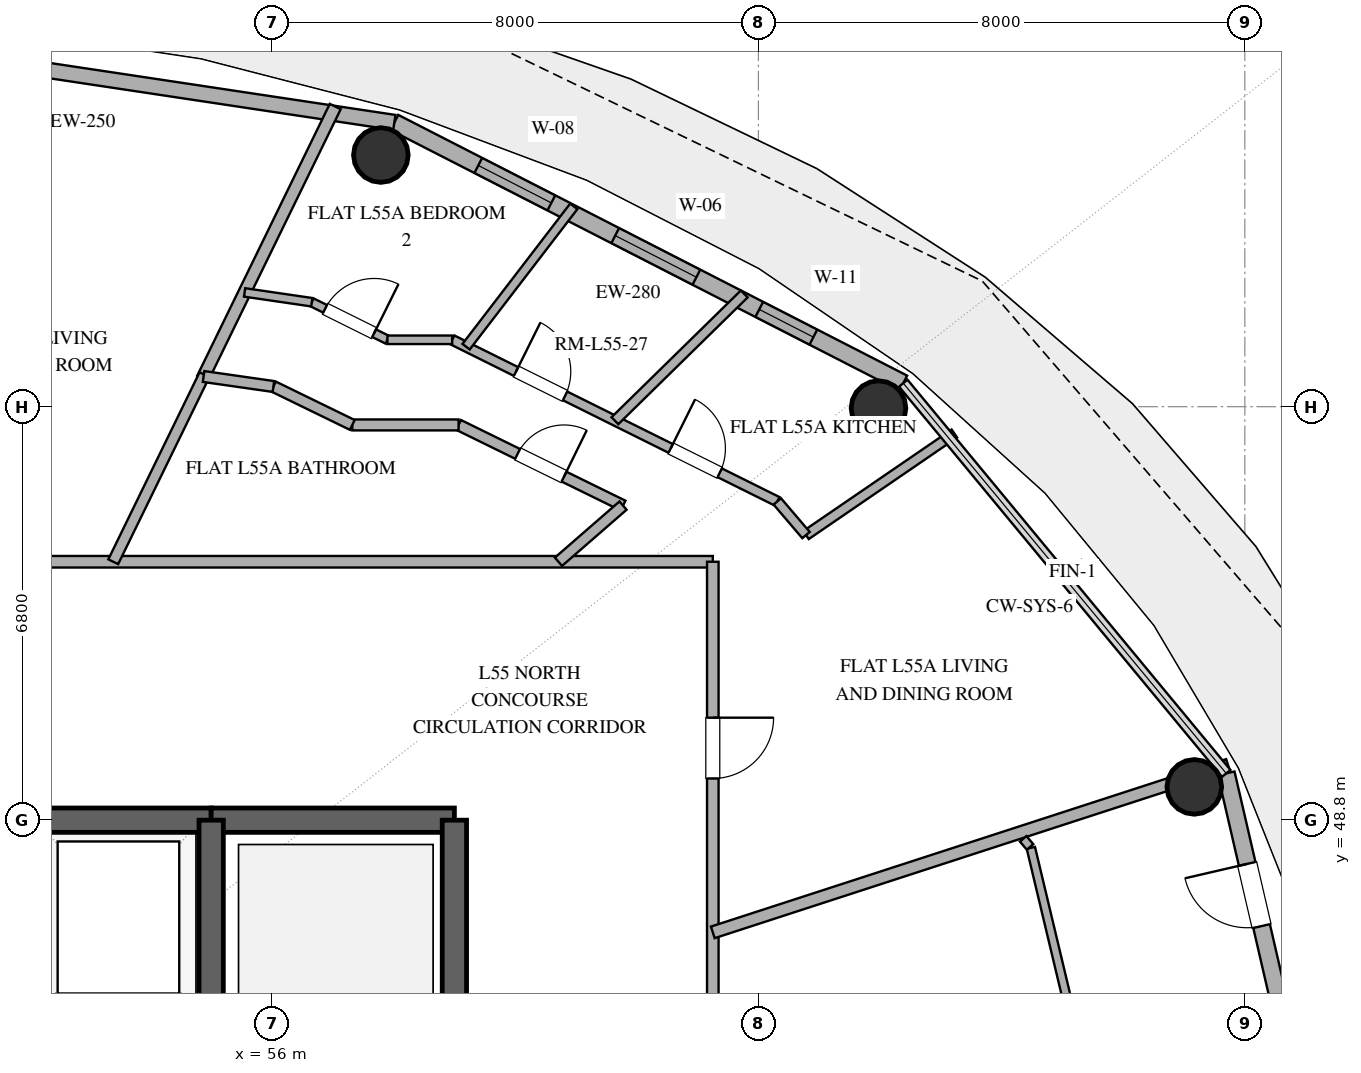
"""IFC4 building model, lengths in metres.
Left out: names, types, materials, properties, quantities, classifications, styles, units other than length and angle.
Written with IfcOpenShell. Run it as: python <this file> out.ifc"""

import sys

from ifc_helpers import new_model, si_unit, direction, frame, frame_2d, origin, origin_2d, place, context, subcontext, project, spatial, rectangle, hollow_circle, extrude, element, fill, save


model = new_model("IFC4")
c1 = context("Model", 3, precision=1e-05, world=origin(), true_north=direction((0.0, 1.0)))
c2 = subcontext(c1, "Body", "Model", "MODEL_VIEW")
j1 = project(units=[si_unit("LENGTHUNIT", "METRE"), si_unit("PLANEANGLEUNIT", "RADIAN")], contexts=[c1])
p1 = place(None, origin())
s1 = spatial("IfcSite", under=j1, at=p1, CompositionType="ELEMENT")
p2 = place(p1, origin())
s2 = spatial("IfcBuilding", under=s1, at=p2, CompositionType="ELEMENT")
p3 = place(p2, frame((0.0, 0.0, 217.2)))
s3 = spatial("IfcBuildingStorey", under=s2, at=p3, CompositionType="ELEMENT", Elevation=217.2)
p4 = place(p3, frame((41.0, 48.8, 0.0), z_axis=(0.0, 0.0, 1.0), x_axis=(1.0, 0.0, 0.0)))
e1 = element("IfcWall", 1, at=p4, inside=s3, PredefinedType="SHEAR", context=c2, shape_type="SweptSolid", body=[
    extrude(rectangle(XDim=14.0, YDim=0.4, at=frame_2d((7.0, 0.0))), origin(), (0.0, 0.0, 1.0), 3.36),
])
p5 = place(p4, frame((6.1, 0.0, 0.0)))
e2 = element("IfcOpeningElement", 2, at=p5, cuts=e1, PredefinedType="OPENING", context=c2, shape_type="SweptSolid", body=[
    extrude(rectangle(XDim=1.8, YDim=2.25, at=frame_2d((0.9, 1.125))), frame((0.0, 0.21, 0.0), z_axis=(0.0, -1.0, 0.0), x_axis=(1.0, 0.0, 0.0)), (0.0, 0.0, 1.0), 0.42),
])
p6 = place(p3, frame((55.0, 48.8, 0.0), z_axis=(0.0, 0.0, 1.0), x_axis=(1.0, 0.0, 0.0)))
e3 = element("IfcWall", 3, at=p6, inside=s3, PredefinedType="SHEAR", context=c2, shape_type="SweptSolid", body=[
    extrude(rectangle(XDim=4.0, YDim=0.4, at=frame_2d((2.0, 0.0))), origin(), (0.0, 0.0, 1.0), 3.36),
])
p7 = place(p3, frame((59.0, 35.2, 0.0), z_axis=(0.0, 0.0, 1.0), x_axis=(0.0, 1.0, 0.0)))
e4 = element("IfcWall", 4, at=p7, inside=s3, PredefinedType="SHEAR", context=c2, shape_type="SweptSolid", body=[
    extrude(rectangle(XDim=13.6, YDim=0.4, at=frame_2d((6.8, 0.0))), origin(), (0.0, 0.0, 1.0), 3.36),
])
p8 = place(p3, frame((55.0, 35.2, 0.0), z_axis=(0.0, 0.0, 1.0), x_axis=(0.0, 1.0, 0.0)))
e5 = element("IfcWall", 5, at=p8, inside=s3, PredefinedType="SHEAR", context=c2, shape_type="SweptSolid", body=[
    extrude(rectangle(XDim=13.6, YDim=0.4, at=frame_2d((6.8, 0.0))), origin(), (0.0, 0.0, 1.0), 3.36),
])
p9 = place(p8, frame((1.15, 0.0, 0.0)))
e6 = element("IfcOpeningElement", 6, at=p9, cuts=e5, PredefinedType="OPENING", context=c2, shape_type="SweptSolid", body=[
    extrude(rectangle(XDim=1.1, YDim=2.2, at=frame_2d((0.55, 1.1))), frame((0.0, 0.21, 0.0), z_axis=(0.0, -1.0, 0.0), x_axis=(1.0, 0.0, 0.0)), (0.0, 0.0, 1.0), 0.42),
])
for number, where, z_axis, x_axis in (
    (7, (71.169, 49.347, 0.0), (0.0, 0.0, 1.0), (1.0, 0.0, 0.0)),
    (8, (65.975, 55.576, 0.0), (0.0, 0.0, 1.0), (1.0, 0.0, 0.0)),
    (9, (57.791, 59.739, 0.0), (0.0, 0.0, 1.0), (1.0, 0.0, 0.0)),
):
    element("IfcColumn", number, at=place(p3, frame(where, z_axis=z_axis, x_axis=x_axis)), inside=s3, PredefinedType="COLUMN", context=c2, shape_type="SweptSolid", body=[
        extrude(hollow_circle(Radius=0.45, WallThickness=0.025, at=origin_2d()), origin(), (0.0, 0.0, 1.0), 3.36),
    ])
p10 = place(p3, frame((73.447, 42.0, 0.0), z_axis=(0.0, 0.0, 1.0), x_axis=(-0.225635078214, 0.974211892495, 0.0)))
e10 = element("IfcWall", 10, at=p10, inside=s3, PredefinedType="SOLIDWALL", context=c2, shape_type="SweptSolid", body=[
    extrude(rectangle(XDim=7.77, YDim=0.28, at=frame_2d((3.885, 0.0))), origin(), (0.0, 0.0, 1.0), 3.36),
])
p11 = place(p10, frame((5.192, 0.0, 0.0)))
e11 = element("IfcOpeningElement", 11, at=p11, cuts=e10, PredefinedType="OPENING", context=c2, shape_type="SweptSolid", body=[
    extrude(rectangle(XDim=1.05, YDim=2.2, at=frame_2d((0.525, 1.1))), frame((0.0, 0.15, 0.0), z_axis=(0.0, -1.0, 0.0), x_axis=(1.0, 0.0, 0.0)), (0.0, 0.0, 1.0), 0.3),
])
p12 = place(p3, frame((66.383, 55.987, 0.0), z_axis=(0.0, 0.0, 1.0), x_axis=(-0.890007394051, 0.455946091699, 0.0)))
e12 = element("IfcWall", 12, at=p12, inside=s3, PredefinedType="SOLIDWALL", context=c2, shape_type="SweptSolid", body=[
    extrude(rectangle(XDim=9.404, YDim=0.28, at=frame_2d((4.702, 0.0))), origin(), (0.0, 0.0, 1.0), 3.36),
])
p13 = place(p12, frame((1.661, 0.0, 0.85)))
e13 = element("IfcOpeningElement", 13, at=p13, cuts=e12, PredefinedType="OPENING", context=c2, shape_type="SweptSolid", body=[
    extrude(rectangle(XDim=1.0, YDim=1.8, at=frame_2d((0.5, 0.9))), frame((0.0, 0.15, 0.0), z_axis=(0.0, -1.0, 0.0), x_axis=(1.0, 0.0, 0.0)), (0.0, 0.0, 1.0), 0.3),
])
p14 = place(p12, frame((3.823, 0.0, 0.85)))
e14 = element("IfcOpeningElement", 14, at=p14, cuts=e12, PredefinedType="OPENING", context=c2, shape_type="SweptSolid", body=[
    extrude(rectangle(XDim=1.5, YDim=2.0, at=frame_2d((0.75, 1.0))), frame((0.0, 0.15, 0.0), z_axis=(0.0, -1.0, 0.0), x_axis=(1.0, 0.0, 0.0)), (0.0, 0.0, 1.0), 0.3),
])
p15 = place(p12, frame((6.503, 0.0, 0.85)))
e15 = element("IfcOpeningElement", 15, at=p15, cuts=e12, PredefinedType="OPENING", context=c2, shape_type="SweptSolid", body=[
    extrude(rectangle(XDim=1.35, YDim=1.8, at=frame_2d((0.675, 0.9))), frame((0.0, 0.15, 0.0), z_axis=(0.0, -1.0, 0.0), x_axis=(1.0, 0.0, 0.0)), (0.0, 0.0, 1.0), 0.3),
])
p16 = place(p3, frame((58.013, 60.274, 0.0), z_axis=(0.0, 0.0, 1.0), x_axis=(-0.988882522213, 0.148698881169, 0.0)))
e16 = element("IfcWall", 16, at=p16, inside=s3, PredefinedType="SOLIDWALL", context=c2, shape_type="SweptSolid", body=[
    extrude(rectangle(XDim=10.125, YDim=0.25, at=frame_2d((5.062, 0.0))), origin(), (0.0, 0.0, 1.0), 3.36),
])
p17 = place(p16, frame((6.534, 0.0, 1.42)))
e17 = element("IfcOpeningElement", 17, at=p17, cuts=e16, PredefinedType="OPENING", context=c2, shape_type="SweptSolid", body=[
    extrude(rectangle(XDim=1.0, YDim=1.05, at=frame_2d((0.5, 0.525))), frame((0.0, 0.135, 0.0), z_axis=(0.0, -1.0, 0.0), x_axis=(1.0, 0.0, 0.0)), (0.0, 0.0, 1.0), 0.27),
])
p18 = place(p3, frame((48.74, 53.05, 0.0), z_axis=(0.0, 0.0, 1.0), x_axis=(1.0, 0.0, 0.0)))
e18 = element("IfcWall", 18, at=p18, inside=s3, PredefinedType="PARTITIONING", context=c2, shape_type="SweptSolid", body=[
    extrude(rectangle(XDim=14.51, YDim=0.19, at=frame_2d((7.255, 0.0))), origin(), (0.0, 0.0, 1.0), 2.72),
])
p19 = place(p18, frame((1.842, 0.0, 0.0)))
e19 = element("IfcOpeningElement", 19, at=p19, cuts=e18, PredefinedType="OPENING", context=c2, shape_type="SweptSolid", body=[
    extrude(rectangle(XDim=1.0, YDim=2.2, at=frame_2d((0.5, 1.1))), frame((0.0, 0.105, 0.0), z_axis=(0.0, -1.0, 0.0), x_axis=(1.0, 0.0, 0.0)), (0.0, 0.0, 1.0), 0.21),
])
p20 = place(p3, frame((63.25, 53.05, 0.0), z_axis=(0.0, 0.0, 1.0), x_axis=(0.0, -1.0, 0.0)))
e20 = element("IfcWall", 20, at=p20, inside=s3, PredefinedType="PARTITIONING", context=c2, shape_type="SweptSolid", body=[
    extrude(rectangle(XDim=16.039, YDim=0.19, at=frame_2d((8.019, 0.0))), origin(), (0.0, 0.0, 1.0), 2.72),
])
p21 = place(p20, frame((9.263, 0.0, 0.0)))
e21 = element("IfcOpeningElement", 21, at=p21, cuts=e20, PredefinedType="OPENING", context=c2, shape_type="SweptSolid", body=[
    extrude(rectangle(XDim=1.0, YDim=2.2, at=frame_2d((0.5, 1.1))), frame((0.0, 0.105, 0.0), z_axis=(0.0, -1.0, 0.0), x_axis=(1.0, 0.0, 0.0)), (0.0, 0.0, 1.0), 0.21),
])
p22 = place(p20, frame((2.564, 0.0, 0.0)))
e22 = element("IfcOpeningElement", 22, at=p22, cuts=e20, PredefinedType="OPENING", context=c2, shape_type="SweptSolid", body=[
    extrude(rectangle(XDim=1.0, YDim=2.2, at=frame_2d((0.5, 1.1))), frame((0.0, 0.105, 0.0), z_axis=(0.0, -1.0, 0.0), x_axis=(1.0, 0.0, 0.0)), (0.0, 0.0, 1.0), 0.21),
])
p23 = place(p3, frame((69.996, 42.0, 0.0), z_axis=(0.0, 0.0, 1.0), x_axis=(-0.232298462197, 0.972644551962, 0.0)))
e23 = element("IfcWall", 23, at=p23, inside=s3, PredefinedType="PARTITIONING", context=c2, shape_type="SweptSolid", body=[
    extrude(rectangle(XDim=6.523, YDim=0.14, at=frame_2d((3.262, 0.0))), origin(), (0.0, 0.0, 1.0), 2.72),
])
p24 = place(p23, frame((2.812, 0.0, 0.0)))
e24 = element("IfcOpeningElement", 24, at=p24, cuts=e23, PredefinedType="OPENING", context=c2, shape_type="SweptSolid", body=[
    extrude(rectangle(XDim=0.9, YDim=2.1, at=frame_2d((0.45, 1.05))), frame((0.0, 0.08, 0.0), z_axis=(0.0, -1.0, 0.0), x_axis=(1.0, 0.0, 0.0)), (0.0, 0.0, 1.0), 0.16),
])
p25 = place(p3, frame((63.25, 46.955, 0.0), z_axis=(0.0, 0.0, 1.0), x_axis=(0.951059035429, 0.30900924117, 0.0)))
e25 = element("IfcWall", 25, at=p25, inside=s3, PredefinedType="PARTITIONING", context=c2, shape_type="SweptSolid", body=[
    extrude(rectangle(XDim=8.91, YDim=0.2, at=frame_2d((4.455, 0.0))), origin(), (0.0, 0.0, 1.0), 2.72),
])
p26 = place(p3, frame((57.041, 60.536, 0.0), z_axis=(0.0, 0.0, 1.0), x_axis=(-0.438355931311, -0.898801467224, 0.0)))
e26 = element("IfcWall", 26, at=p26, inside=s3, PredefinedType="PARTITIONING", context=c2, shape_type="SweptSolid", body=[
    extrude(rectangle(XDim=4.974, YDim=0.2, at=frame_2d((2.487, 0.0))), origin(), (0.0, 0.0, 1.0), 2.72),
])
p27 = place(p3, frame((54.89, 56.127, 0.0), z_axis=(0.0, 0.0, 1.0), x_axis=(-0.438347749683, -0.898805457453, 0.0)))
e27 = element("IfcWall", 27, at=p27, inside=s3, PredefinedType="PLUMBINGWALL", context=c2, shape_type="SweptSolid", body=[
    extrude(rectangle(XDim=3.423, YDim=0.18, at=frame_2d((1.711, 0.0))), origin(), (0.0, 0.0, 1.0), 2.72),
])
p28 = place(p3, frame((58.964, 56.7, 0.0), z_axis=(0.0, 0.0, 1.0), x_axis=(0.895447007867, -0.445168121166, 0.0)))
e28 = element("IfcWall", 28, at=p28, inside=s3, PredefinedType="PLUMBINGWALL", context=c2, shape_type="SweptSolid", body=[
    extrude(rectangle(XDim=5.971, YDim=0.16, at=frame_2d((2.986, 0.0))), origin(), (0.0, 0.0, 1.0), 2.72),
])
p29 = place(p28, frame((4.013, 0.0, 0.0)))
e29 = element("IfcOpeningElement", 29, at=p29, cuts=e28, PredefinedType="OPENING", context=c2, shape_type="SweptSolid", body=[
    extrude(rectangle(XDim=0.9, YDim=2.1, at=frame_2d((0.45, 1.05))), frame((0.0, 0.09, 0.0), z_axis=(0.0, -1.0, 0.0), x_axis=(1.0, 0.0, 0.0)), (0.0, 0.0, 1.0), 0.18),
])
p30 = place(p28, frame((1.173, 0.0, 0.0)))
e30 = element("IfcOpeningElement", 30, at=p30, cuts=e28, PredefinedType="OPENING", context=c2, shape_type="SweptSolid", body=[
    extrude(rectangle(XDim=0.9, YDim=2.1, at=frame_2d((0.45, 1.05))), frame((0.0, 0.09, 0.0), z_axis=(0.0, -1.0, 0.0), x_axis=(1.0, 0.0, 0.0)), (0.0, 0.0, 1.0), 0.18),
])
p31 = place(p3, frame((59.069, 55.3, 0.0), z_axis=(0.0, 0.0, 1.0), x_axis=(0.897805130008, -0.440392947867, 0.0)))
e31 = element("IfcWall", 31, at=p31, inside=s3, PredefinedType="PLUMBINGWALL", context=c2, shape_type="SweptSolid", body=[
    extrude(rectangle(XDim=3.012, YDim=0.18, at=frame_2d((1.506, 0.0))), origin(), (0.0, 0.0, 1.0), 2.72),
])
p32 = place(p31, frame((1.081, 0.0, 0.0)))
e32 = element("IfcOpeningElement", 32, at=p32, cuts=e31, PredefinedType="OPENING", context=c2, shape_type="SweptSolid", body=[
    extrude(rectangle(XDim=0.85, YDim=2.1, at=frame_2d((0.425, 1.05))), frame((0.0, 0.1, 0.0), z_axis=(0.0, -1.0, 0.0), x_axis=(1.0, 0.0, 0.0)), (0.0, 0.0, 1.0), 0.2),
])
p33 = place(p3, frame((63.767, 57.454, 0.0), z_axis=(0.0, 0.0, 1.0), x_axis=(-0.714203003572, -0.699938618515, 0.0)))
e33 = element("IfcWall", 33, at=p33, inside=s3, PredefinedType="PLUMBINGWALL", context=c2, shape_type="SweptSolid", body=[
    extrude(rectangle(XDim=2.978, YDim=0.16, at=frame_2d((1.489, 0.0))), origin(), (0.0, 0.0, 1.0), 2.72),
])
p34 = place(p3, frame((64.783, 53.489, 0.0), z_axis=(0.0, 0.0, 1.0), x_axis=(0.825165456639, 0.564891112666, 0.0)))
e34 = element("IfcWall", 34, at=p34, inside=s3, PredefinedType="PLUMBINGWALL", context=c2, shape_type="SweptSolid", body=[
    extrude(rectangle(XDim=2.957, YDim=0.16, at=frame_2d((1.478, 0.0))), origin(), (0.0, 0.0, 1.0), 2.72),
])
p35 = place(p3, frame((60.964, 58.895, 0.0), z_axis=(0.0, 0.0, 1.0), x_axis=(-0.608822468724, -0.793306499139, 0.0)))
e35 = element("IfcWall", 35, at=p35, inside=s3, PredefinedType="PARTITIONING", context=c2, shape_type="SweptSolid", body=[
    extrude(rectangle(XDim=2.91, YDim=0.15, at=frame_2d((1.455, 0.0))), origin(), (0.0, 0.0, 1.0), 2.72),
])
p36 = place(p3, frame((57.321, 55.3, 0.0), z_axis=(0.0, 0.0, 1.0), x_axis=(1.0, 0.0, 0.0)))
e36 = element("IfcWall", 36, at=p36, inside=s3, PredefinedType="PLUMBINGWALL", context=c2, shape_type="SweptSolid", body=[
    extrude(rectangle(XDim=1.748, YDim=0.18, at=frame_2d((0.874, 0.0))), origin(), (0.0, 0.0, 1.0), 2.72),
])
p37 = place(p3, frame((56.024, 55.932, 0.0), z_axis=(0.0, 0.0, 1.0), x_axis=(0.898916394035, -0.438120207861, 0.0)))
e37 = element("IfcWall", 37, at=p37, inside=s3, PredefinedType="PLUMBINGWALL", context=c2, shape_type="SweptSolid", body=[
    extrude(rectangle(XDim=1.443, YDim=0.18, at=frame_2d((0.721, 0.0))), origin(), (0.0, 0.0, 1.0), 2.72),
])
p38 = place(p3, frame((61.774, 53.973, 0.0), z_axis=(0.0, 0.0, 1.0), x_axis=(-0.7546578079, -0.656118581489, 0.0)))
e38 = element("IfcWall", 38, at=p38, inside=s3, PredefinedType="PLUMBINGWALL", context=c2, shape_type="SweptSolid", body=[
    extrude(rectangle(XDim=1.407, YDim=0.18, at=frame_2d((0.704, 0.0))), origin(), (0.0, 0.0, 1.0), 2.72),
])
p39 = place(p3, frame((56.655, 57.318, 0.0), z_axis=(0.0, 0.0, 1.0), x_axis=(0.895584310315, -0.444891833053, 0.0)))
e39 = element("IfcWall", 39, at=p39, inside=s3, PredefinedType="PARTITIONING", context=c2, shape_type="SweptSolid", body=[
    extrude(rectangle(XDim=1.389, YDim=0.14, at=frame_2d((0.694, 0.0))), origin(), (0.0, 0.0, 1.0), 2.72),
])
p40 = place(p39, frame((0.244, 0.0, 0.0)))
e40 = element("IfcOpeningElement", 40, at=p40, cuts=e39, PredefinedType="OPENING", context=c2, shape_type="SweptSolid", body=[
    extrude(rectangle(XDim=0.9, YDim=2.1, at=frame_2d((0.45, 1.05))), frame((0.0, 0.08, 0.0), z_axis=(0.0, -1.0, 0.0), x_axis=(1.0, 0.0, 0.0)), (0.0, 0.0, 1.0), 0.16),
])
p41 = place(p3, frame((54.875, 56.096, 0.0), z_axis=(0.0, 0.0, 1.0), x_axis=(0.989924230083, -0.141598088596, 0.0)))
e41 = element("IfcWall", 41, at=p41, inside=s3, PredefinedType="PLUMBINGWALL", context=c2, shape_type="SweptSolid", body=[
    extrude(rectangle(XDim=1.16, YDim=0.18, at=frame_2d((0.58, 0.0))), origin(), (0.0, 0.0, 1.0), 2.72),
])
p42 = place(p3, frame((55.55, 57.479, 0.0), z_axis=(0.0, 0.0, 1.0), x_axis=(0.989534281859, -0.144297973051, 0.0)))
e42 = element("IfcWall", 42, at=p42, inside=s3, PredefinedType="PARTITIONING", context=c2, shape_type="SweptSolid", body=[
    extrude(rectangle(XDim=1.117, YDim=0.14, at=frame_2d((0.558, 0.0))), origin(), (0.0, 0.0, 1.0), 2.72),
])
p43 = place(p3, frame((57.899, 56.7, 0.0), z_axis=(0.0, 0.0, 1.0), x_axis=(1.0, 0.0, 0.0)))
e43 = element("IfcWall", 43, at=p43, inside=s3, PredefinedType="PARTITIONING", context=c2, shape_type="SweptSolid", body=[
    extrude(rectangle(XDim=1.065, YDim=0.14, at=frame_2d((0.533, 0.0))), origin(), (0.0, 0.0, 1.0), 2.72),
])
p44 = place(p3, frame((64.311, 54.042, 0.0), z_axis=(0.0, 0.0, 1.0), x_axis=(0.648992334632, -0.760794945823, 0.0)))
e44 = element("IfcWall", 44, at=p44, inside=s3, PredefinedType="PLUMBINGWALL", context=c2, shape_type="SweptSolid", body=[
    extrude(rectangle(XDim=0.727, YDim=0.16, at=frame_2d((0.364, 0.0))), origin(), (0.0, 0.0, 1.0), 2.72),
])
p45 = place(p3, frame((68.468, 48.36, 0.0), z_axis=(0.0, 0.0, 1.0), x_axis=(-0.649065422773, 0.760732592282, 0.0)))
e45 = element("IfcWall", 45, at=p45, inside=s3, PredefinedType="PARTITIONING", context=c2, shape_type="SweptSolid", body=[
    extrude(rectangle(XDim=0.175, YDim=0.14, at=frame_2d((0.087, 0.0))), origin(), (0.0, 0.0, 1.0), 2.72),
])
p46 = place(p11, origin())
e46 = element("IfcDoor", 46, at=p46, inside=s3, OperationType="SINGLE_SWING_RIGHT", PredefinedType="DOOR", context=c2, shape_type="SweptSolid", body=[
    extrude(rectangle(XDim=1.05, YDim=2.2, at=frame_2d((0.525, 1.1))), frame((0.0, 0.025, 0.0), z_axis=(0.0, -1.0, 0.0), x_axis=(1.0, 0.0, 0.0)), (0.0, 0.0, 1.0), 0.05),
])
fill(e11, e46)
p47 = place(p13, origin())
e47 = element("IfcWindow", 47, at=p47, inside=s3, PartitioningType="SINGLE_PANEL", PredefinedType="WINDOW", context=c2, shape_type="SweptSolid", body=[
    extrude(rectangle(XDim=1.0, YDim=1.8, at=frame_2d((0.5, 0.9))), frame((0.0, 0.03, 0.0), z_axis=(0.0, -1.0, 0.0), x_axis=(1.0, 0.0, 0.0)), (0.0, 0.0, 1.0), 0.06),
])
fill(e13, e47)
p48 = place(p14, origin())
e48 = element("IfcWindow", 48, at=p48, inside=s3, PartitioningType="SINGLE_PANEL", PredefinedType="WINDOW", context=c2, shape_type="SweptSolid", body=[
    extrude(rectangle(XDim=1.5, YDim=2.0, at=frame_2d((0.75, 1.0))), frame((0.0, 0.03, 0.0), z_axis=(0.0, -1.0, 0.0), x_axis=(1.0, 0.0, 0.0)), (0.0, 0.0, 1.0), 0.06),
])
fill(e14, e48)
p49 = place(p15, origin())
e49 = element("IfcWindow", 49, at=p49, inside=s3, PartitioningType="SINGLE_PANEL", PredefinedType="WINDOW", context=c2, shape_type="SweptSolid", body=[
    extrude(rectangle(XDim=1.35, YDim=1.8, at=frame_2d((0.675, 0.9))), frame((0.0, 0.03, 0.0), z_axis=(0.0, -1.0, 0.0), x_axis=(1.0, 0.0, 0.0)), (0.0, 0.0, 1.0), 0.06),
])
fill(e15, e49)
p50 = place(p22, origin())
e50 = element("IfcDoor", 50, at=p50, inside=s3, OperationType="SINGLE_SWING_LEFT", PredefinedType="DOOR", context=c2, shape_type="SweptSolid", body=[
    extrude(rectangle(XDim=1.0, YDim=2.2, at=frame_2d((0.5, 1.1))), frame((0.0, 0.025, 0.0), z_axis=(0.0, -1.0, 0.0), x_axis=(1.0, 0.0, 0.0)), (0.0, 0.0, 1.0), 0.05),
])
fill(e22, e50)
p51 = place(p29, origin())
e51 = element("IfcDoor", 51, at=p51, inside=s3, OperationType="SINGLE_SWING_LEFT", PredefinedType="DOOR", context=c2, shape_type="SweptSolid", body=[
    extrude(rectangle(XDim=0.9, YDim=2.1, at=frame_2d((0.45, 1.05))), frame((0.0, 0.025, 0.0), z_axis=(0.0, -1.0, 0.0), x_axis=(1.0, 0.0, 0.0)), (0.0, 0.0, 1.0), 0.05),
])
fill(e29, e51)
p52 = place(p30, origin())
e52 = element("IfcDoor", 52, at=p52, inside=s3, OperationType="SINGLE_SWING_LEFT", PredefinedType="DOOR", context=c2, shape_type="SweptSolid", body=[
    extrude(rectangle(XDim=0.9, YDim=2.1, at=frame_2d((0.45, 1.05))), frame((0.0, 0.025, 0.0), z_axis=(0.0, -1.0, 0.0), x_axis=(1.0, 0.0, 0.0)), (0.0, 0.0, 1.0), 0.05),
])
fill(e30, e52)
p53 = place(p32, origin())
e53 = element("IfcDoor", 53, at=p53, inside=s3, OperationType="SINGLE_SWING_RIGHT", PredefinedType="DOOR", context=c2, shape_type="SweptSolid", body=[
    extrude(rectangle(XDim=0.85, YDim=2.1, at=frame_2d((0.425, 1.05))), frame((0.0, 0.025, 0.0), z_axis=(0.0, -1.0, 0.0), x_axis=(1.0, 0.0, 0.0)), (0.0, 0.0, 1.0), 0.05),
])
fill(e32, e53)
p54 = place(p40, origin())
e54 = element("IfcDoor", 54, at=p54, inside=s3, OperationType="SINGLE_SWING_RIGHT", PredefinedType="DOOR", context=c2, shape_type="SweptSolid", body=[
    extrude(rectangle(XDim=0.9, YDim=2.1, at=frame_2d((0.45, 1.05))), frame((0.0, 0.025, 0.0), z_axis=(0.0, -1.0, 0.0), x_axis=(1.0, 0.0, 0.0)), (0.0, 0.0, 1.0), 0.05),
])
fill(e40, e54)
save(model, sys.argv[1])
